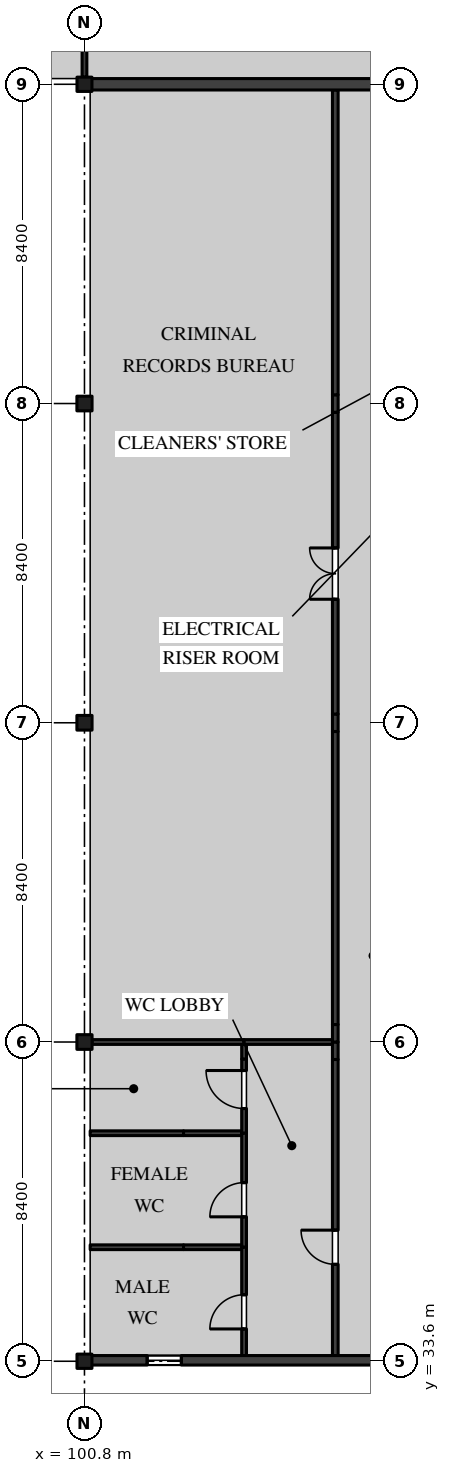
"""IFC4 building model, lengths in metres.
Left out: names, types, materials, properties, quantities, classifications, styles, units other than length and angle.
Written with IfcOpenShell. Run it as: python <this file> out.ifc"""

import sys

from ifc_helpers import new_model, si_unit, direction, frame, frame_2d, origin, origin_2d, place, context, subcontext, project, spatial, rectangle, i_section, extrude, element, fill, save


model = new_model("IFC4")
c1 = context("Model", 3, precision=1e-05, world=origin(), true_north=direction((0.0, 1.0)))
c2 = subcontext(c1, "Body", "Model", "MODEL_VIEW")
j1 = project(units=[si_unit("LENGTHUNIT", "METRE"), si_unit("PLANEANGLEUNIT", "RADIAN")], contexts=[c1])
p1 = place(None, origin())
s1 = spatial("IfcSite", under=j1, at=p1, CompositionType="ELEMENT")
p2 = place(p1, origin())
s2 = spatial("IfcBuilding", under=s1, at=p2, CompositionType="ELEMENT")
p3 = place(p2, frame((0.0, 0.0, 9.9)))
s3 = spatial("IfcBuildingStorey", under=s2, at=p3, CompositionType="ELEMENT", Elevation=9.9)
p4 = place(p3, frame((100.8, 33.6, 0.0), z_axis=(0.0, 0.0, 1.0), x_axis=(1.0, 0.0, 0.0)))
e1 = element("IfcColumn", 1, at=p4, inside=s3, PredefinedType="COLUMN", context=c2, shape_type="SweptSolid", body=[
    extrude(i_section(OverallWidth=0.394, OverallDepth=0.376, WebThickness=0.017, FlangeThickness=0.028, FilletRadius=0.015, at=origin_2d()), origin(), (0.0, 0.0, 1.0), 4.37),
])
for number, where, z_axis, x_axis in (
    (2, (100.8, 42.0, 0.0), (0.0, 0.0, 1.0), (1.0, 0.0, 0.0)),
    (3, (100.8, 50.4, 0.0), (0.0, 0.0, 1.0), (1.0, 0.0, 0.0)),
    (4, (100.8, 58.8, 0.0), (0.0, 0.0, 1.0), (1.0, 0.0, 0.0)),
):
    element("IfcColumn", number, at=place(p3, frame(where, z_axis=z_axis, x_axis=x_axis)), inside=s3, PredefinedType="COLUMN", context=c2, shape_type="SweptSolid", body=[
        extrude(i_section(OverallWidth=0.399, OverallDepth=0.386, WebThickness=0.021, FlangeThickness=0.033, FilletRadius=0.015, at=origin_2d()), origin(), (0.0, 0.0, 1.0), 4.37),
    ])
p5 = place(p3, frame((100.8, 67.2, 0.0), z_axis=(0.0, 0.0, 1.0), x_axis=(1.0, 0.0, 0.0)))
e5 = element("IfcColumn", 5, at=p5, inside=s3, PredefinedType="COLUMN", context=c2, shape_type="SweptSolid", body=[
    extrude(i_section(OverallWidth=0.394, OverallDepth=0.376, WebThickness=0.017, FlangeThickness=0.028, FilletRadius=0.015, at=origin_2d()), origin(), (0.0, 0.0, 1.0), 4.37),
])
p6 = place(p3, frame((107.4, 33.75, 0.0), z_axis=(0.0, 0.0, 1.0), x_axis=(0.0, 1.0, 0.0)))
e6 = element("IfcWall", 6, at=p6, inside=s3, PredefinedType="PARTITIONING", context=c2, shape_type="SweptSolid", body=[
    extrude(rectangle(XDim=7.79, YDim=0.15, at=frame_2d((3.895, 0.0))), origin(), (0.0, 0.0, 1.0), 4.37),
])
p7 = place(p6, frame((2.4, 0.0, 0.0)))
e7 = element("IfcOpeningElement", 7, at=p7, cuts=e6, PredefinedType="OPENING", context=c2, shape_type="SweptSolid", body=[
    extrude(rectangle(XDim=0.9, YDim=2.1, at=frame_2d((0.45, 1.05))), frame((0.0, 0.085, 0.0), z_axis=(0.0, -1.0, 0.0), x_axis=(1.0, 0.0, 0.0)), (0.0, 0.0, 1.0), 0.17),
])
for number, where, z_axis, x_axis in (
    (8, (107.4, 41.54, 0.0), (0.0, 0.0, 1.0), (0.0, 1.0, 0.0)),
    (9, (107.4, 42.0, 0.0), (0.0, 0.0, 1.0), (0.0, 1.0, 0.0)),
):
    element("IfcWall", number, at=place(p3, frame(where, z_axis=z_axis, x_axis=x_axis)), inside=s3, PredefinedType="PARTITIONING", context=c2, shape_type="SweptSolid", body=[
        extrude(rectangle(XDim=0.46, YDim=0.15, at=frame_2d((0.23, 0.0))), origin(), (0.0, 0.0, 1.0), 3.746),
    ])
p8 = place(p3, frame((107.4, 42.46, 0.0), z_axis=(0.0, 0.0, 1.0), x_axis=(0.0, 1.0, 0.0)))
e10 = element("IfcWall", 10, at=p8, inside=s3, PredefinedType="PARTITIONING", context=c2, shape_type="SweptSolid", body=[
    extrude(rectangle(XDim=7.71, YDim=0.15, at=frame_2d((3.855, 0.0))), origin(), (0.0, 0.0, 1.0), 4.37),
])
p9 = place(p3, frame((107.4, 50.17, 0.0), z_axis=(0.0, 0.0, 1.0), x_axis=(0.0, 1.0, 0.0)))
e11 = element("IfcWall", 11, at=p9, inside=s3, PredefinedType="PARTITIONING", context=c2, shape_type="SweptSolid", body=[
    extrude(rectangle(XDim=0.46, YDim=0.15, at=frame_2d((0.23, 0.0))), origin(), (0.0, 0.0, 1.0), 3.746),
])
p10 = place(p3, frame((107.4, 50.63, 0.0), z_axis=(0.0, 0.0, 1.0), x_axis=(0.0, 1.0, 0.0)))
e12 = element("IfcWall", 12, at=p10, inside=s3, PredefinedType="PARTITIONING", context=c2, shape_type="SweptSolid", body=[
    extrude(rectangle(XDim=7.94, YDim=0.15, at=frame_2d((3.97, 0.0))), origin(), (0.0, 0.0, 1.0), 4.37),
])
p11 = place(p10, frame((3.02, 0.0, 0.0)))
e13 = element("IfcOpeningElement", 13, at=p11, cuts=e12, PredefinedType="OPENING", context=c2, shape_type="SweptSolid", body=[
    extrude(rectangle(XDim=1.35, YDim=2.1, at=frame_2d((0.675, 1.05))), frame((0.0, 0.085, 0.0), z_axis=(0.0, -1.0, 0.0), x_axis=(1.0, 0.0, 0.0)), (0.0, 0.0, 1.0), 0.17),
])
p12 = place(p3, frame((107.4, 58.57, 0.0), z_axis=(0.0, 0.0, 1.0), x_axis=(0.0, 1.0, 0.0)))
e14 = element("IfcWall", 14, at=p12, inside=s3, PredefinedType="PARTITIONING", context=c2, shape_type="SweptSolid", body=[
    extrude(rectangle(XDim=0.46, YDim=0.15, at=frame_2d((0.23, 0.0))), origin(), (0.0, 0.0, 1.0), 3.746),
])
p13 = place(p3, frame((107.4, 59.03, 0.0), z_axis=(0.0, 0.0, 1.0), x_axis=(0.0, 1.0, 0.0)))
e15 = element("IfcWall", 15, at=p13, inside=s3, PredefinedType="PARTITIONING", context=c2, shape_type="SweptSolid", body=[
    extrude(rectangle(XDim=8.02, YDim=0.15, at=frame_2d((4.01, 0.0))), origin(), (0.0, 0.0, 1.0), 4.37),
])
p14 = place(p3, frame((100.95, 39.6, 0.0), z_axis=(0.0, 0.0, 1.0), x_axis=(1.0, 0.0, 0.0)))
e16 = element("IfcWall", 16, at=p14, inside=s3, PredefinedType="PARTITIONING", context=c2, shape_type="SweptSolid", body=[
    extrude(rectangle(XDim=2.457, YDim=0.125, at=frame_2d((1.229, 0.0))), origin(), (0.0, 0.0, 1.0), 4.37),
])
p15 = place(p3, frame((103.407, 39.6, 0.0), z_axis=(0.0, 0.0, 1.0), x_axis=(1.0, 0.0, 0.0)))
e17 = element("IfcWall", 17, at=p15, inside=s3, PredefinedType="PARTITIONING", context=c2, shape_type="SweptSolid", body=[
    extrude(rectangle(XDim=1.531, YDim=0.125, at=frame_2d((0.766, 0.0))), origin(), (0.0, 0.0, 1.0), 3.895),
])
p16 = place(p3, frame((105.0, 39.6, 0.0), z_axis=(0.0, 0.0, 1.0), x_axis=(0.0, 1.0, 0.0)))
e18 = element("IfcWall", 18, at=p16, inside=s3, PredefinedType="PARTITIONING", context=c2, shape_type="SweptSolid", body=[
    extrude(rectangle(XDim=1.953, YDim=0.125, at=frame_2d((0.977, 0.0))), origin(), (0.0, 0.0, 1.0), 4.37),
])
p17 = place(p16, frame((0.65, 0.0, 0.0)))
e19 = element("IfcOpeningElement", 19, at=p17, cuts=e18, PredefinedType="OPENING", context=c2, shape_type="SweptSolid", body=[
    extrude(rectangle(XDim=1.0, YDim=2.1, at=frame_2d((0.5, 1.05))), frame((0.0, 0.073, 0.0), z_axis=(0.0, -1.0, 0.0), x_axis=(1.0, 0.0, 0.0)), (0.0, 0.0, 1.0), 0.145),
])
p18 = place(p3, frame((105.0, 41.553, 0.0), z_axis=(0.0, 0.0, 1.0), x_axis=(0.0, 1.0, 0.0)))
e20 = element("IfcWall", 20, at=p18, inside=s3, PredefinedType="PARTITIONING", context=c2, shape_type="SweptSolid", body=[
    extrude(rectangle(XDim=0.385, YDim=0.125, at=frame_2d((0.192, 0.0))), origin(), (0.0, 0.0, 1.0), 3.746),
])
p19 = place(p3, frame((100.999, 42.0, 0.0), z_axis=(0.0, 0.0, 1.0), x_axis=(1.0, 0.0, 0.0)))
e21 = element("IfcWall", 21, at=p19, inside=s3, PredefinedType="PARTITIONING", context=c2, shape_type="SweptSolid", body=[
    extrude(rectangle(XDim=4.001, YDim=0.125, at=frame_2d((2.0, 0.0))), origin(), (0.0, 0.0, 1.0), 3.746),
])
p20 = place(p3, frame((105.0, 36.6, 0.0), z_axis=(0.0, 0.0, 1.0), x_axis=(0.0, 1.0, 0.0)))
e22 = element("IfcWall", 22, at=p20, inside=s3, PredefinedType="PARTITIONING", context=c2, shape_type="SweptSolid", body=[
    extrude(rectangle(XDim=3.0, YDim=0.125, at=frame_2d((1.5, 0.0))), origin(), (0.0, 0.0, 1.0), 4.37),
])
p21 = place(p20, frame((0.8, 0.0, 0.0)))
e23 = element("IfcOpeningElement", 23, at=p21, cuts=e22, PredefinedType="OPENING", context=c2, shape_type="SweptSolid", body=[
    extrude(rectangle(XDim=0.9, YDim=2.1, at=frame_2d((0.45, 1.05))), frame((0.0, 0.073, 0.0), z_axis=(0.0, -1.0, 0.0), x_axis=(1.0, 0.0, 0.0)), (0.0, 0.0, 1.0), 0.145),
])
p22 = place(p3, frame((100.95, 36.6, 0.0), z_axis=(0.0, 0.0, 1.0), x_axis=(1.0, 0.0, 0.0)))
e24 = element("IfcWall", 24, at=p22, inside=s3, PredefinedType="PARTITIONING", context=c2, shape_type="SweptSolid", body=[
    extrude(rectangle(XDim=2.457, YDim=0.125, at=frame_2d((1.229, 0.0))), origin(), (0.0, 0.0, 1.0), 4.37),
])
p23 = place(p3, frame((103.407, 36.6, 0.0), z_axis=(0.0, 0.0, 1.0), x_axis=(1.0, 0.0, 0.0)))
e25 = element("IfcWall", 25, at=p23, inside=s3, PredefinedType="PARTITIONING", context=c2, shape_type="SweptSolid", body=[
    extrude(rectangle(XDim=1.531, YDim=0.125, at=frame_2d((0.766, 0.0))), origin(), (0.0, 0.0, 1.0), 3.895),
])
p24 = place(p3, frame((105.0, 33.75, 0.0), z_axis=(0.0, 0.0, 1.0), x_axis=(0.0, 1.0, 0.0)))
e26 = element("IfcWall", 26, at=p24, inside=s3, PredefinedType="PARTITIONING", context=c2, shape_type="SweptSolid", body=[
    extrude(rectangle(XDim=2.85, YDim=0.125, at=frame_2d((1.425, 0.0))), origin(), (0.0, 0.0, 1.0), 4.37),
])
p25 = place(p24, frame((0.7, 0.0, 0.0)))
e27 = element("IfcOpeningElement", 27, at=p25, cuts=e26, PredefinedType="OPENING", context=c2, shape_type="SweptSolid", body=[
    extrude(rectangle(XDim=0.9, YDim=2.1, at=frame_2d((0.45, 1.05))), frame((0.0, 0.073, 0.0), z_axis=(0.0, -1.0, 0.0), x_axis=(1.0, 0.0, 0.0)), (0.0, 0.0, 1.0), 0.145),
])
p26 = place(p3, frame((105.0, 42.0, 0.0), z_axis=(0.0, 0.0, 1.0), x_axis=(1.0, 0.0, 0.0)))
e28 = element("IfcWall", 28, at=p26, inside=s3, PredefinedType="PARTITIONING", context=c2, shape_type="SweptSolid", body=[
    extrude(rectangle(XDim=2.325, YDim=0.125, at=frame_2d((1.163, 0.0))), origin(), (0.0, 0.0, 1.0), 3.746),
])
p27 = place(p3, frame((100.8, 67.388, 0.0), z_axis=(0.0, 0.0, 1.0), x_axis=(0.0, 1.0, 0.0)))
e29 = element("IfcWall", 29, at=p27, inside=s3, PredefinedType="PARTITIONING", context=c2, shape_type="SweptSolid", body=[
    extrude(rectangle(XDim=6.637, YDim=0.125, at=frame_2d((3.318, 0.0))), origin(), (0.0, 0.0, 1.0), 3.746),
])
p28 = place(p3, frame((100.802, 33.625, 0.0), z_axis=(0.0, 0.0, 1.0), x_axis=(1.0, 0.0, 0.0)))
e30 = element("IfcWall", 30, at=p28, inside=s3, PredefinedType="SOLIDWALL", context=c2, shape_type="SweptSolid", body=[
    extrude(rectangle(XDim=8.198, YDim=0.25, at=frame_2d((4.099, 0.0))), origin(), (0.0, 0.0, 1.0), 3.746),
])
p29 = place(p28, frame((1.649, 0.0, 1.5)))
e31 = element("IfcOpeningElement", 31, at=p29, cuts=e30, PredefinedType="OPENING", context=c2, shape_type="SweptSolid", body=[
    extrude(rectangle(XDim=0.9, YDim=1.2, at=frame_2d((0.45, 0.6))), frame((0.0, 0.135, 0.0), z_axis=(0.0, -1.0, 0.0), x_axis=(1.0, 0.0, 0.0)), (0.0, 0.0, 1.0), 0.27),
])
p30 = place(p3, frame((109.0, 67.2, 0.0), z_axis=(0.0, 0.0, 1.0), x_axis=(-1.0, 0.0, 0.0)))
e32 = element("IfcWall", 32, at=p30, inside=s3, PredefinedType="SOLIDWALL", context=c2, shape_type="SweptSolid", body=[
    extrude(rectangle(XDim=8.198, YDim=0.3, at=frame_2d((4.099, 0.0))), origin(), (0.0, 0.0, 1.0), 3.746),
])
p31 = place(p17, origin())
e33 = element("IfcDoor", 33, at=p31, inside=s3, OperationType="SINGLE_SWING_LEFT", PredefinedType="DOOR", context=c2, shape_type="SweptSolid", body=[
    extrude(rectangle(XDim=1.0, YDim=2.1, at=frame_2d((0.5, 1.05))), frame((0.0, 0.02, 0.0), z_axis=(0.0, -1.0, 0.0), x_axis=(1.0, 0.0, 0.0)), (0.0, 0.0, 1.0), 0.04),
])
fill(e19, e33)
p32 = place(p21, origin())
e34 = element("IfcDoor", 34, at=p32, inside=s3, OperationType="SINGLE_SWING_RIGHT", PredefinedType="DOOR", context=c2, shape_type="SweptSolid", body=[
    extrude(rectangle(XDim=0.9, YDim=2.1, at=frame_2d((0.45, 1.05))), frame((0.0, 0.02, 0.0), z_axis=(0.0, -1.0, 0.0), x_axis=(1.0, 0.0, 0.0)), (0.0, 0.0, 1.0), 0.04),
])
fill(e23, e34)
p33 = place(p7, origin())
e35 = element("IfcDoor", 35, at=p33, inside=s3, OperationType="SINGLE_SWING_LEFT", PredefinedType="DOOR", context=c2, shape_type="SweptSolid", body=[
    extrude(rectangle(XDim=0.9, YDim=2.1, at=frame_2d((0.45, 1.05))), frame((0.0, 0.025, 0.0), z_axis=(0.0, -1.0, 0.0), x_axis=(1.0, 0.0, 0.0)), (0.0, 0.0, 1.0), 0.05),
])
fill(e7, e35)
p34 = place(p25, origin())
e36 = element("IfcDoor", 36, at=p34, inside=s3, OperationType="SINGLE_SWING_RIGHT", PredefinedType="DOOR", context=c2, shape_type="SweptSolid", body=[
    extrude(rectangle(XDim=0.9, YDim=2.1, at=frame_2d((0.45, 1.05))), frame((0.0, 0.02, 0.0), z_axis=(0.0, -1.0, 0.0), x_axis=(1.0, 0.0, 0.0)), (0.0, 0.0, 1.0), 0.04),
])
fill(e27, e36)
p35 = place(p11, origin())
e37 = element("IfcDoor", 37, at=p35, inside=s3, OperationType="DOUBLE_DOOR_SINGLE_SWING", PredefinedType="DOOR", context=c2, shape_type="SweptSolid", body=[
    extrude(rectangle(XDim=1.35, YDim=2.1, at=frame_2d((0.675, 1.05))), frame((0.0, 0.025, 0.0), z_axis=(0.0, -1.0, 0.0), x_axis=(1.0, 0.0, 0.0)), (0.0, 0.0, 1.0), 0.05),
])
fill(e13, e37)
p36 = place(p29, origin())
e38 = element("IfcWindow", 38, at=p36, inside=s3, PartitioningType="SINGLE_PANEL", PredefinedType="WINDOW", context=c2, shape_type="SweptSolid", body=[
    extrude(rectangle(XDim=0.9, YDim=1.2, at=frame_2d((0.45, 0.6))), frame((0.0, 0.04, 0.0), z_axis=(0.0, -1.0, 0.0), x_axis=(1.0, 0.0, 0.0)), (0.0, 0.0, 1.0), 0.08),
])
fill(e31, e38)
save(model, sys.argv[1])
